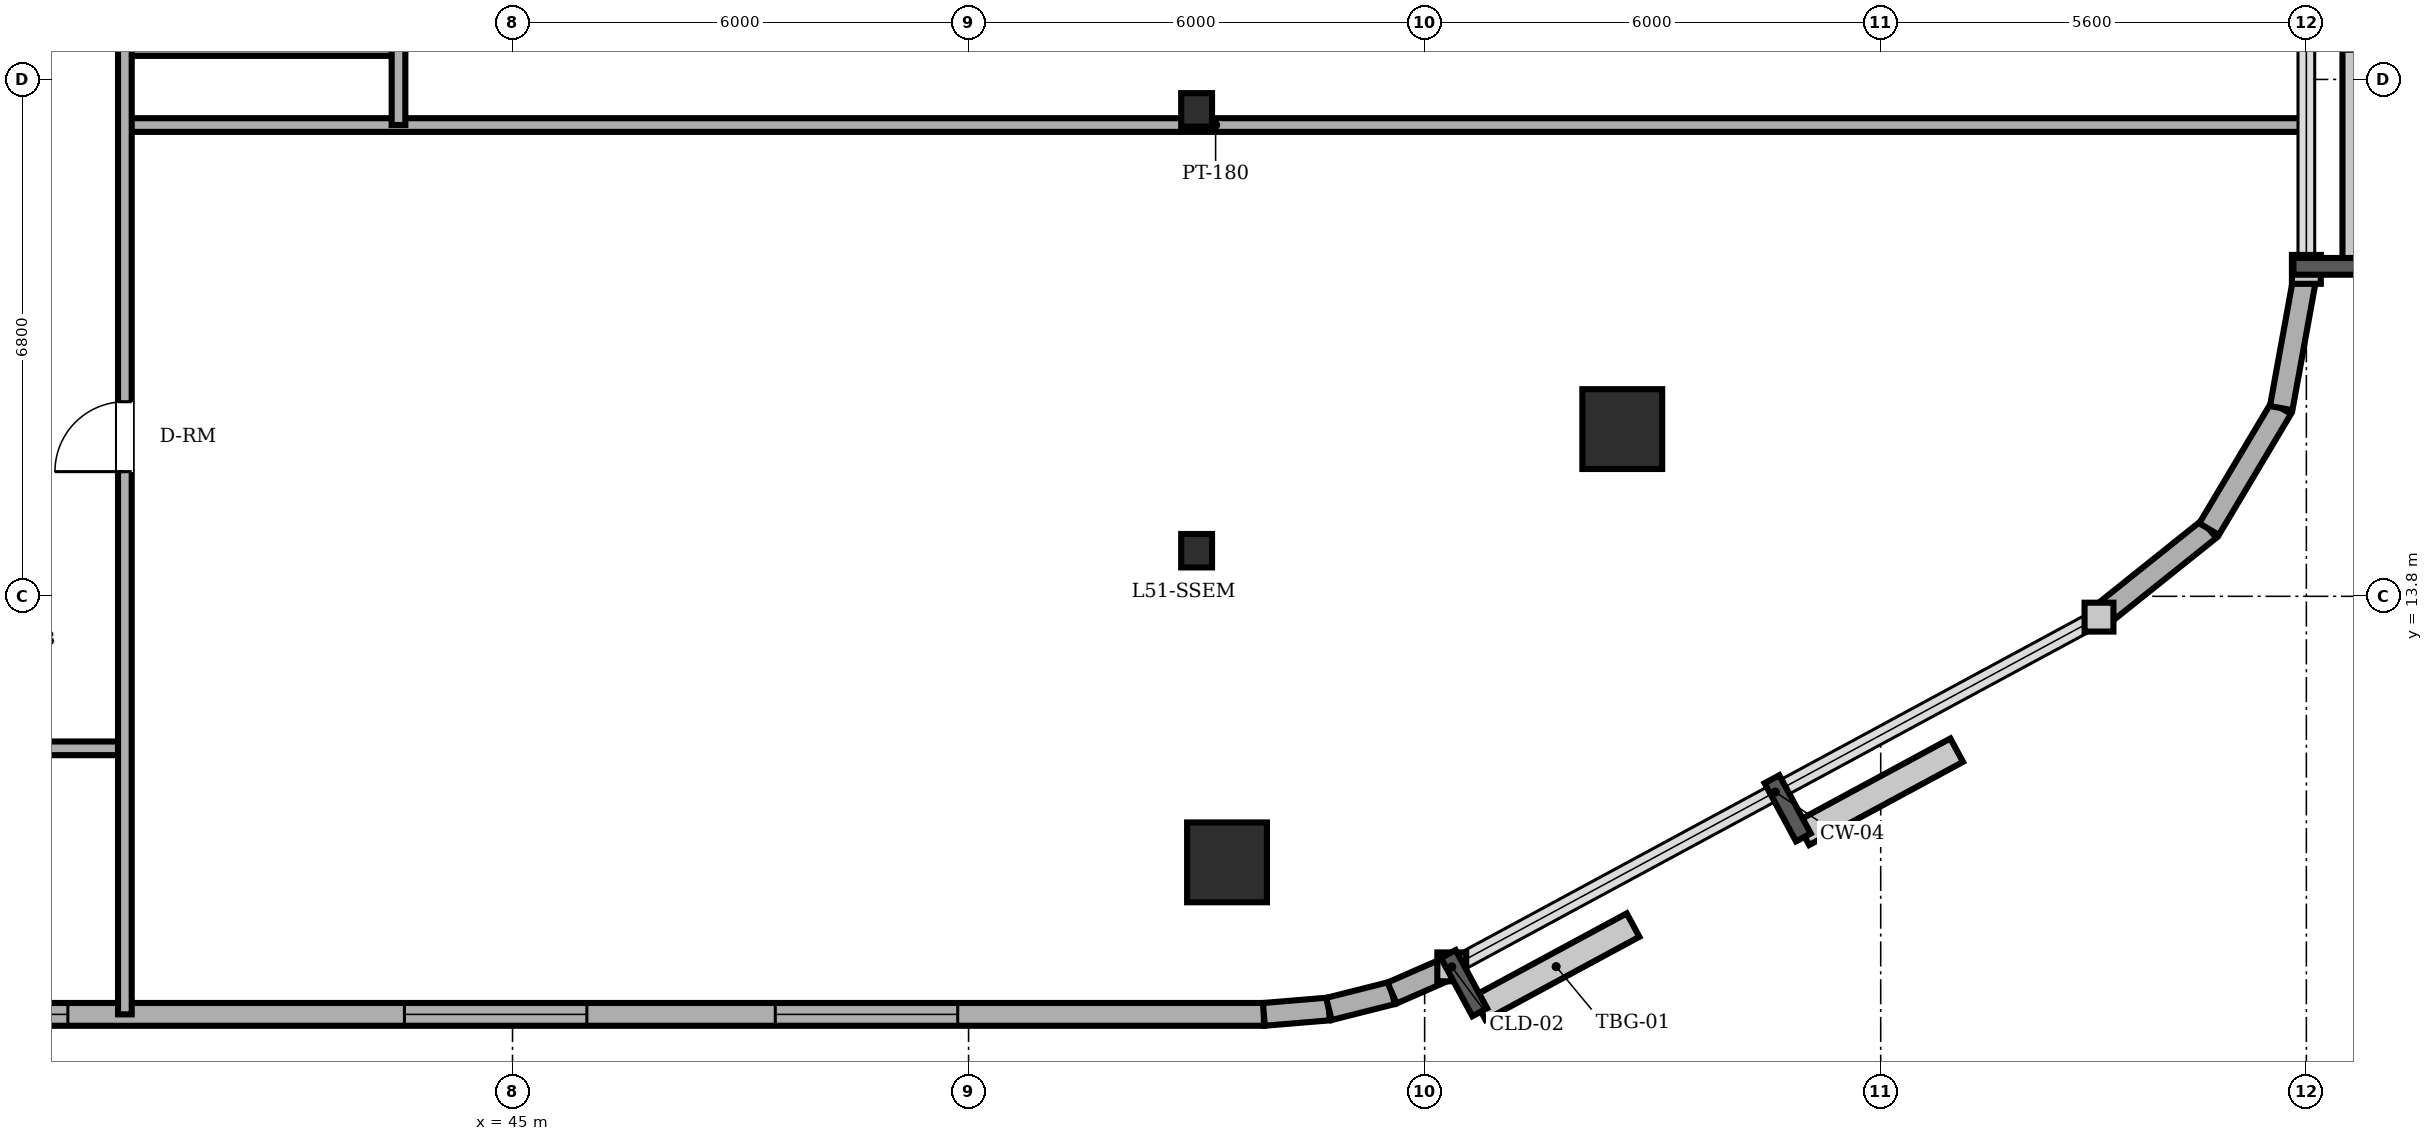
"""IFC4 building model, lengths in metres.
Left out: names, types, materials, properties, quantities, classifications, styles, units other than length and angle.
Written with IfcOpenShell. Run it as: python <this file> out.ifc"""

import sys

from ifc_helpers import new_model, si_unit, direction, frame, frame_2d, origin, origin_2d, place, context, subcontext, project, spatial, rectangle, circle, i_section, extrude, element, fill, save


model = new_model("IFC4")
c1 = context("Model", 3, precision=1e-05, world=origin(), true_north=direction((0.0, 1.0)))
c2 = subcontext(c1, "Body", "Model", "MODEL_VIEW")
j1 = project(units=[si_unit("LENGTHUNIT", "METRE"), si_unit("PLANEANGLEUNIT", "RADIAN")], contexts=[c1])
p1 = place(None, origin())
s1 = spatial("IfcSite", under=j1, at=p1, CompositionType="ELEMENT")
p2 = place(p1, origin())
s2 = spatial("IfcBuilding", under=s1, at=p2, CompositionType="ELEMENT")
p3 = place(p2, frame((0.0, 0.0, 196.2)))
s3 = spatial("IfcBuildingStorey", under=s2, at=p3, CompositionType="ELEMENT", Elevation=196.2)
for number, where, z_axis, x_axis in (
    (1, (54.4, 10.3, 0.0), (0.0, 0.0, 1.0), (1.0, 0.0, 0.0)),
    (2, (59.6, 16.0, 0.0), (0.0, 0.0, 1.0), (1.0, 0.0, 0.0)),
):
    element("IfcColumn", number, at=place(p3, frame(where, z_axis=z_axis, x_axis=x_axis)), inside=s3, PredefinedType="COLUMN", context=c2, shape_type="SweptSolid", body=[
        extrude(circle(Radius=0.525, at=origin_2d()), origin(), (0.0, 0.0, 1.0), 5.1),
    ])
for number, where, z_axis, x_axis in (
    (3, (54.0, 14.4, 0.0), (0.0, 0.0, 1.0), (1.0, 0.0, 0.0)),
    (4, (54.0, 20.2, 0.0), (0.0, 0.0, 1.0), (1.0, 0.0, 0.0)),
):
    element("IfcColumn", number, at=place(p3, frame(where, z_axis=z_axis, x_axis=x_axis)), inside=s3, PredefinedType="COLUMN", context=c2, shape_type="SweptSolid", body=[
        extrude(i_section(OverallWidth=0.406, OverallDepth=0.44, WebThickness=0.024, FlangeThickness=0.039, FilletRadius=0.015, at=origin_2d()), origin(), (0.0, 0.0, 1.0), 5.1),
    ])
p4 = place(p3, frame((22.4, 8.3, 0.0), z_axis=(0.0, 0.0, 1.0), x_axis=(1.0, 0.0, 0.0)))
e5 = element("IfcWall", 5, at=p4, inside=s3, PredefinedType="SOLIDWALL", context=c2, shape_type="SweptSolid", body=[
    extrude(rectangle(XDim=32.485, YDim=0.3, at=frame_2d((16.243, 0.0))), origin(), (0.0, 0.0, 1.0), 4.9),
])
p5 = place(p4, frame((11.3, 0.0, 0.0)))
e6 = element("IfcOpeningElement", 6, at=p5, cuts=e5, PredefinedType="OPENING", context=c2, shape_type="SweptSolid", body=[
    extrude(rectangle(XDim=0.95, YDim=2.2, at=frame_2d((0.475, 1.1))), frame((0.0, 0.16, 0.0), z_axis=(0.0, -1.0, 0.0), x_axis=(1.0, 0.0, 0.0)), (0.0, 0.0, 1.0), 0.32),
])
p6 = place(p4, frame((3.733, 0.0, 0.85)))
e7 = element("IfcOpeningElement", 7, at=p6, cuts=e5, PredefinedType="OPENING", context=c2, shape_type="SweptSolid", body=[
    extrude(rectangle(XDim=2.4, YDim=2.1, at=frame_2d((1.2, 1.05))), frame((0.0, 0.16, 0.0), z_axis=(0.0, -1.0, 0.0), x_axis=(1.0, 0.0, 0.0)), (0.0, 0.0, 1.0), 0.32),
])
p7 = place(p4, frame((8.067, 0.0, 0.85)))
e8 = element("IfcOpeningElement", 8, at=p7, cuts=e5, PredefinedType="OPENING", context=c2, shape_type="SweptSolid", body=[
    extrude(rectangle(XDim=2.4, YDim=2.1, at=frame_2d((1.2, 1.05))), frame((0.0, 0.16, 0.0), z_axis=(0.0, -1.0, 0.0), x_axis=(1.0, 0.0, 0.0)), (0.0, 0.0, 1.0), 0.32),
])
p8 = place(p4, frame((14.35, 0.0, 0.85)))
e9 = element("IfcOpeningElement", 9, at=p8, cuts=e5, PredefinedType="OPENING", context=c2, shape_type="SweptSolid", body=[
    extrude(rectangle(XDim=2.4, YDim=2.1, at=frame_2d((1.2, 1.05))), frame((0.0, 0.16, 0.0), z_axis=(0.0, -1.0, 0.0), x_axis=(1.0, 0.0, 0.0)), (0.0, 0.0, 1.0), 0.32),
])
p9 = place(p4, frame((21.178, 0.0, 0.85)))
e10 = element("IfcOpeningElement", 10, at=p9, cuts=e5, PredefinedType="OPENING", context=c2, shape_type="SweptSolid", body=[
    extrude(rectangle(XDim=2.4, YDim=2.1, at=frame_2d((1.2, 1.05))), frame((0.0, 0.16, 0.0), z_axis=(0.0, -1.0, 0.0), x_axis=(1.0, 0.0, 0.0)), (0.0, 0.0, 1.0), 0.32),
])
p10 = place(p4, frame((26.057, 0.0, 0.85)))
e11 = element("IfcOpeningElement", 11, at=p10, cuts=e5, PredefinedType="OPENING", context=c2, shape_type="SweptSolid", body=[
    extrude(rectangle(XDim=2.4, YDim=2.1, at=frame_2d((1.2, 1.05))), frame((0.0, 0.16, 0.0), z_axis=(0.0, -1.0, 0.0), x_axis=(1.0, 0.0, 0.0)), (0.0, 0.0, 1.0), 0.32),
])
p11 = place(p3, frame((54.885, 8.3, 0.0), z_axis=(0.0, 0.0, 1.0), x_axis=(0.996565355958, 0.082809971041, 0.0)))
e12 = element("IfcWall", 12, at=p11, inside=s3, PredefinedType="SOLIDWALL", context=c2, shape_type="SweptSolid", body=[
    extrude(rectangle(XDim=0.858, YDim=0.3, at=frame_2d((0.429, 0.0))), origin(), (0.0, 0.0, 1.0), 4.9),
])
p12 = place(p3, frame((55.74, 8.371, 0.0), z_axis=(0.0, 0.0, 1.0), x_axis=(0.969536346338, 0.244947490555, 0.0)))
e13 = element("IfcWall", 13, at=p12, inside=s3, PredefinedType="SOLIDWALL", context=c2, shape_type="SweptSolid", body=[
    extrude(rectangle(XDim=0.857, YDim=0.3, at=frame_2d((0.429, 0.0))), origin(), (0.0, 0.0, 1.0), 4.9),
])
p13 = place(p3, frame((56.571, 8.581, 0.0), z_axis=(0.0, 0.0, 1.0), x_axis=(0.916085473636, 0.400983048261, 0.0)))
e14 = element("IfcWall", 14, at=p13, inside=s3, PredefinedType="SOLIDWALL", context=c2, shape_type="SweptSolid", body=[
    extrude(rectangle(XDim=0.858, YDim=0.3, at=frame_2d((0.429, 0.0))), origin(), (0.0, 0.0, 1.0), 4.9),
])
p14 = place(p3, frame((65.872, 13.526, 0.0), z_axis=(0.0, 0.0, 1.0), x_axis=(0.780920189257, 0.624630817372, 0.0)))
e15 = element("IfcWall", 15, at=p14, inside=s3, PredefinedType="SOLIDWALL", context=c2, shape_type="SweptSolid", body=[
    extrude(rectangle(XDim=1.854, YDim=0.3, at=frame_2d((0.927, 0.0))), origin(), (0.0, 0.0, 1.0), 4.9),
])
p15 = place(p3, frame((67.32, 14.684, 0.0), z_axis=(0.0, 0.0, 1.0), x_axis=(0.512072018927, 0.858942516955, 0.0)))
e16 = element("IfcWall", 16, at=p15, inside=s3, PredefinedType="SOLIDWALL", context=c2, shape_type="SweptSolid", body=[
    extrude(rectangle(XDim=1.853, YDim=0.3, at=frame_2d((0.927, 0.0))), origin(), (0.0, 0.0, 1.0), 4.9),
])
p16 = place(p3, frame((68.269, 16.276, 0.0), z_axis=(0.0, 0.0, 1.0), x_axis=(0.178468469252, 0.983945631365, 0.0)))
e17 = element("IfcWall", 17, at=p16, inside=s3, PredefinedType="SOLIDWALL", context=c2, shape_type="SweptSolid", body=[
    extrude(rectangle(XDim=1.855, YDim=0.3, at=frame_2d((0.927, 0.0))), origin(), (0.0, 0.0, 1.0), 4.9),
])
p17 = place(p3, frame((17.656, 11.8, 0.0), z_axis=(0.0, 0.0, 1.0), x_axis=(1.0, 0.0, 0.0)))
e18 = element("IfcWall", 18, at=p17, inside=s3, PredefinedType="PARTITIONING", context=c2, shape_type="SweptSolid", body=[
    extrude(rectangle(XDim=22.244, YDim=0.18, at=frame_2d((11.122, 0.0))), origin(), (0.0, 0.0, 1.0), 4.9),
])
p18 = place(p17, frame((11.394, 0.0, 0.0)))
e19 = element("IfcOpeningElement", 19, at=p18, cuts=e18, PredefinedType="OPENING", context=c2, shape_type="SweptSolid", body=[
    extrude(rectangle(XDim=0.9, YDim=2.05, at=frame_2d((0.45, 1.025))), frame((0.0, 0.1, 0.0), z_axis=(0.0, -1.0, 0.0), x_axis=(1.0, 0.0, 0.0)), (0.0, 0.0, 1.0), 0.2),
])
p19 = place(p3, frame((39.9, 20.0, 0.0), z_axis=(0.0, 0.0, 1.0), x_axis=(1.0, 0.0, 0.0)))
e20 = element("IfcWall", 20, at=p19, inside=s3, PredefinedType="PARTITIONING", context=c2, shape_type="SweptSolid", body=[
    extrude(rectangle(XDim=28.7, YDim=0.18, at=frame_2d((14.35, 0.0))), origin(), (0.0, 0.0, 1.0), 4.482),
])
p20 = place(p3, frame((39.9, 21.0, 0.0), z_axis=(0.0, 0.0, 1.0), x_axis=(1.0, 0.0, 0.0)))
e21 = element("IfcWall", 21, at=p20, inside=s3, PredefinedType="PARTITIONING", context=c2, shape_type="SweptSolid", body=[
    extrude(rectangle(XDim=3.6, YDim=0.18, at=frame_2d((1.8, 0.0))), origin(), (0.0, 0.0, 1.0), 4.9),
])
p21 = place(p3, frame((39.9, 8.3, 0.0), z_axis=(0.0, 0.0, 1.0), x_axis=(0.0, 1.0, 0.0)))
e22 = element("IfcWall", 22, at=p21, inside=s3, PredefinedType="PARTITIONING", context=c2, shape_type="SweptSolid", body=[
    extrude(rectangle(XDim=31.4, YDim=0.18, at=frame_2d((15.7, 0.0))), origin(), (0.0, 0.0, 1.0), 4.9),
])
p22 = place(p21, frame((13.725, 0.0, 0.0)))
e23 = element("IfcOpeningElement", 23, at=p22, cuts=e22, PredefinedType="OPENING", context=c2, shape_type="SweptSolid", body=[
    extrude(rectangle(XDim=0.95, YDim=2.15, at=frame_2d((0.475, 1.075))), frame((0.0, 0.1, 0.0), z_axis=(0.0, -1.0, 0.0), x_axis=(1.0, 0.0, 0.0)), (0.0, 0.0, 1.0), 0.2),
])
p23 = place(p21, frame((17.025, 0.0, 0.0)))
e24 = element("IfcOpeningElement", 24, at=p23, cuts=e22, PredefinedType="OPENING", context=c2, shape_type="SweptSolid", body=[
    extrude(rectangle(XDim=0.95, YDim=2.15, at=frame_2d((0.475, 1.075))), frame((0.0, 0.1, 0.0), z_axis=(0.0, -1.0, 0.0), x_axis=(1.0, 0.0, 0.0)), (0.0, 0.0, 1.0), 0.2),
])
p24 = place(p21, frame((24.34, 0.0, 0.0)))
e25 = element("IfcOpeningElement", 25, at=p24, cuts=e22, PredefinedType="OPENING", context=c2, shape_type="SweptSolid", body=[
    extrude(rectangle(XDim=0.92, YDim=2.1, at=frame_2d((0.46, 1.05))), frame((0.0, 0.1, 0.0), z_axis=(0.0, -1.0, 0.0), x_axis=(1.0, 0.0, 0.0)), (0.0, 0.0, 1.0), 0.2),
])
p25 = place(p21, frame((7.14, 0.0, 0.0)))
e26 = element("IfcOpeningElement", 26, at=p25, cuts=e22, PredefinedType="OPENING", context=c2, shape_type="SweptSolid", body=[
    extrude(rectangle(XDim=0.92, YDim=2.1, at=frame_2d((0.46, 1.05))), frame((0.0, 0.1, 0.0), z_axis=(0.0, -1.0, 0.0), x_axis=(1.0, 0.0, 0.0)), (0.0, 0.0, 1.0), 0.2),
])
p26 = place(p3, frame((43.5, 20.0, 0.0), z_axis=(0.0, 0.0, 1.0), x_axis=(0.0, 1.0, 0.0)))
e27 = element("IfcWall", 27, at=p26, inside=s3, PredefinedType="PARTITIONING", context=c2, shape_type="SweptSolid", body=[
    extrude(rectangle(XDim=10.0, YDim=0.18, at=frame_2d((5.0, 0.0))), origin(), (0.0, 0.0, 1.0), 4.9),
])
p27 = place(p8, origin())
e28 = element("IfcWindow", 28, at=p27, inside=s3, PartitioningType="TRIPLE_PANEL_VERTICAL", PredefinedType="WINDOW", context=c2, shape_type="SweptSolid", body=[
    extrude(rectangle(XDim=2.4, YDim=2.1, at=frame_2d((1.2, 1.05))), frame((0.0, 0.03, 0.0), z_axis=(0.0, -1.0, 0.0), x_axis=(1.0, 0.0, 0.0)), (0.0, 0.0, 1.0), 0.06),
])
fill(e9, e28)
p28 = place(p9, origin())
e29 = element("IfcWindow", 29, at=p28, inside=s3, PartitioningType="TRIPLE_PANEL_VERTICAL", PredefinedType="WINDOW", context=c2, shape_type="SweptSolid", body=[
    extrude(rectangle(XDim=2.4, YDim=2.1, at=frame_2d((1.2, 1.05))), frame((0.0, 0.03, 0.0), z_axis=(0.0, -1.0, 0.0), x_axis=(1.0, 0.0, 0.0)), (0.0, 0.0, 1.0), 0.06),
])
fill(e10, e29)
p29 = place(p10, origin())
e30 = element("IfcWindow", 30, at=p29, inside=s3, PartitioningType="TRIPLE_PANEL_VERTICAL", PredefinedType="WINDOW", context=c2, shape_type="SweptSolid", body=[
    extrude(rectangle(XDim=2.4, YDim=2.1, at=frame_2d((1.2, 1.05))), frame((0.0, 0.03, 0.0), z_axis=(0.0, -1.0, 0.0), x_axis=(1.0, 0.0, 0.0)), (0.0, 0.0, 1.0), 0.06),
])
fill(e11, e30)
p30 = place(p25, origin())
e31 = element("IfcDoor", 31, at=p30, inside=s3, OperationType="SINGLE_SWING_LEFT", PredefinedType="DOOR", context=c2, shape_type="SweptSolid", body=[
    extrude(rectangle(XDim=0.92, YDim=2.1, at=frame_2d((0.46, 1.05))), frame((0.0, 0.025, 0.0), z_axis=(0.0, -1.0, 0.0), x_axis=(1.0, 0.0, 0.0)), (0.0, 0.0, 1.0), 0.05),
])
fill(e26, e31)
save(model, sys.argv[1])
